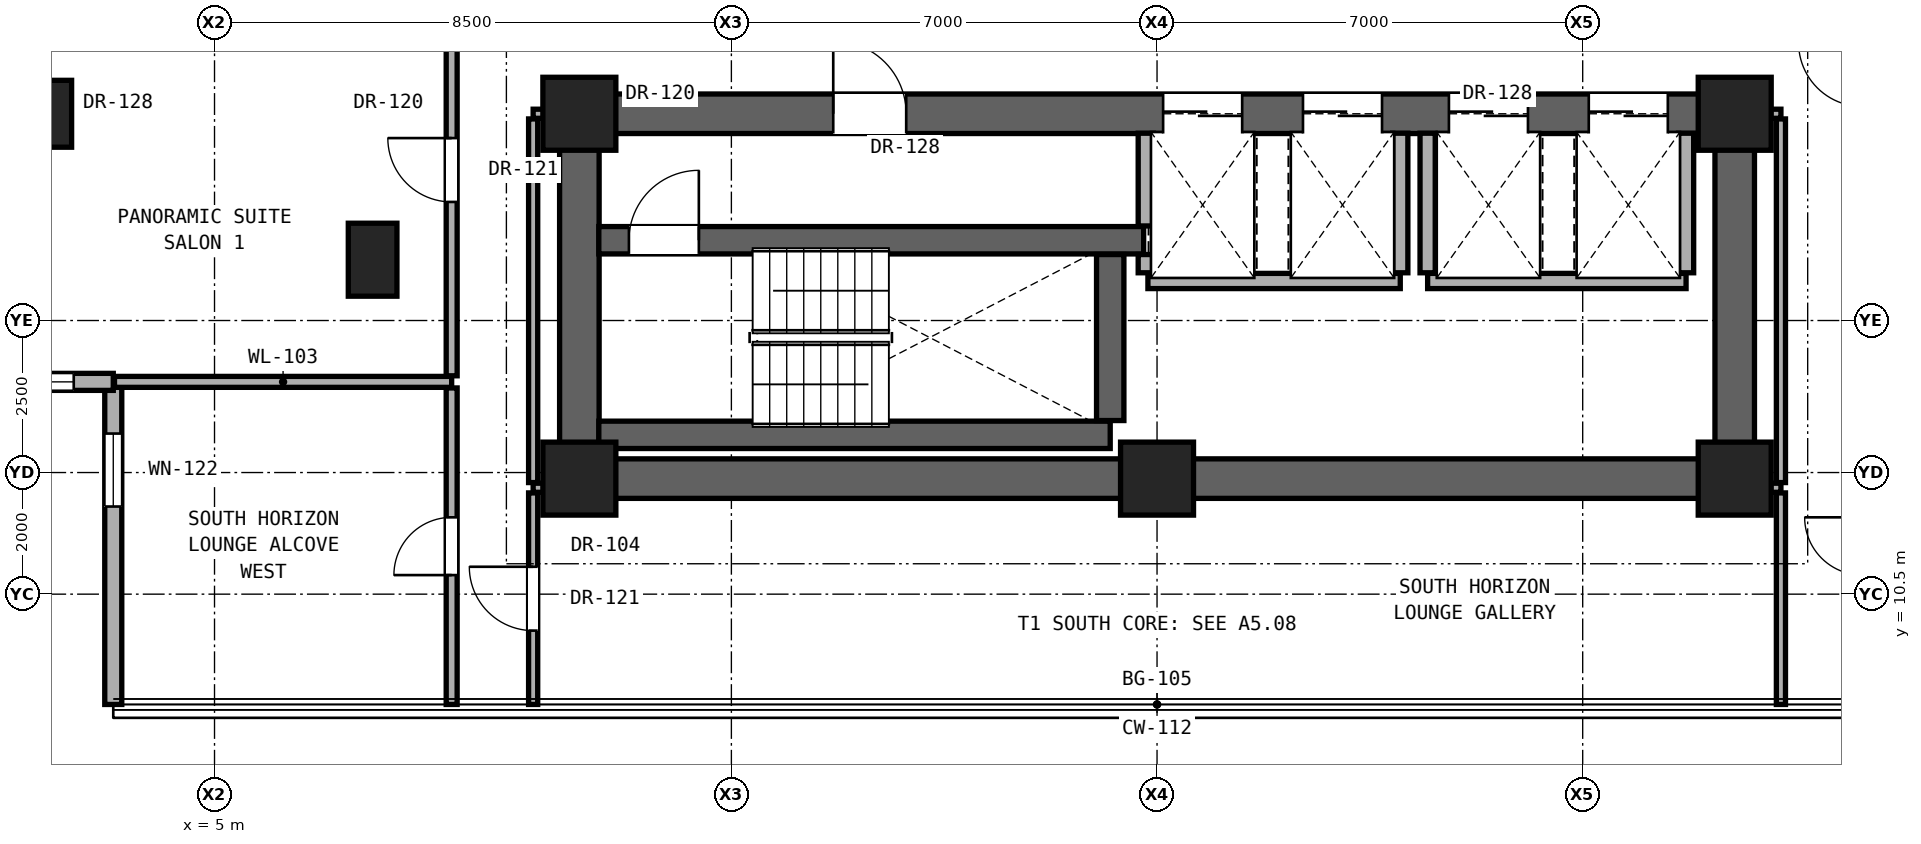
"""IFC4 building model, lengths in metres.
Left out: names, types, materials, properties, quantities, classifications, styles, units other than length and angle.
Written with IfcOpenShell. Run it as: python <this file> out.ifc"""

import sys

from ifc_helpers import new_model, si_unit, direction, frame, frame_2d, origin, origin_2d, place, context, subcontext, project, spatial, rectangle, hollow_rectangle, extrude, element, fill, save


model = new_model("IFC4")
c1 = context("Model", 3, precision=1e-05, world=origin(), true_north=direction((0.0, 1.0)))
c2 = subcontext(c1, "Body", "Model", "MODEL_VIEW")
j1 = project(units=[si_unit("LENGTHUNIT", "METRE"), si_unit("PLANEANGLEUNIT", "RADIAN")], contexts=[c1])
p1 = place(None, origin())
s1 = spatial("IfcSite", under=j1, at=p1, CompositionType="ELEMENT")
p2 = place(p1, origin())
s2 = spatial("IfcBuilding", under=s1, at=p2, CompositionType="ELEMENT")
p3 = place(p2, frame((0.0, 0.0, 114.8)))
s3 = spatial("IfcBuildingStorey", under=s2, at=p3, CompositionType="ELEMENT", Elevation=114.8)
for number, where, z_axis, x_axis in (
    (1, (11.0, 12.4, 0.0), (0.0, 0.0, 1.0), (1.0, 0.0, 0.0)),
    (2, (20.5, 12.4, 0.0), (0.0, 0.0, 1.0), (1.0, 0.0, 0.0)),
    (3, (30.0, 12.4, 0.0), (0.0, 0.0, 1.0), (1.0, 0.0, 0.0)),
    (4, (11.0, 18.4, 0.0), (0.0, 0.0, 1.0), (1.0, 0.0, 0.0)),
    (5, (30.0, 18.4, 0.0), (0.0, 0.0, 1.0), (1.0, 0.0, 0.0)),
):
    element("IfcColumn", number, at=place(p3, frame(where, z_axis=z_axis, x_axis=x_axis)), inside=s3, PredefinedType="COLUMN", context=c2, shape_type="SweptSolid", body=[
        extrude(rectangle(XDim=1.2, YDim=1.2, at=origin_2d()), origin(), (0.0, 0.0, 1.0), 3.3),
    ])
p4 = place(p3, frame((2.1, 18.4, 0.0), z_axis=(0.0, 0.0, 1.0), x_axis=(1.0, 0.0, 0.0)))
e6 = element("IfcColumn", 6, at=p4, inside=s3, PredefinedType="COLUMN", context=c2, shape_type="SweptSolid", body=[
    extrude(hollow_rectangle(XDim=1.1, YDim=1.1, WallThickness=0.06, at=origin_2d()), origin(), (0.0, 0.0, 1.0), 3.3),
])
p5 = place(p3, frame((7.6, 16.0, 0.0), z_axis=(0.0, 0.0, 1.0), x_axis=(1.0, 0.0, 0.0)))
e7 = element("IfcColumn", 7, at=p5, inside=s3, PredefinedType="PILASTER", context=c2, shape_type="SweptSolid", body=[
    extrude(rectangle(XDim=0.8, YDim=1.2, at=origin_2d()), origin(), (0.0, 0.0, 1.0), 3.3),
])
p6 = place(p3, frame((11.0, 12.4, 0.0), z_axis=(0.0, 0.0, 1.0), x_axis=(1.0, 0.0, 0.0)))
e8 = element("IfcWall", 8, at=p6, inside=s3, PredefinedType="SHEAR", context=c2, shape_type="SweptSolid", body=[
    extrude(rectangle(XDim=19.0, YDim=0.65, at=frame_2d((9.5, 0.0))), origin(), (0.0, 0.0, 1.0), 3.08),
])
for number, where, z_axis, x_axis in (
    (9, (11.0, 12.4, 0.0), (0.0, 0.0, 1.0), (0.0, 1.0, 0.0)),
    (10, (30.0, 12.4, 0.0), (0.0, 0.0, 1.0), (0.0, 1.0, 0.0)),
):
    element("IfcWall", number, at=place(p3, frame(where, z_axis=z_axis, x_axis=x_axis)), inside=s3, PredefinedType="SHEAR", context=c2, shape_type="SweptSolid", body=[
        extrude(rectangle(XDim=6.0, YDim=0.65, at=frame_2d((3.0, 0.0))), origin(), (0.0, 0.0, 1.0), 3.08),
    ])
p7 = place(p3, frame((11.0, 18.4, 0.0), z_axis=(0.0, 0.0, 1.0), x_axis=(1.0, 0.0, 0.0)))
e11 = element("IfcWall", 11, at=p7, inside=s3, PredefinedType="SHEAR", context=c2, shape_type="SweptSolid", body=[
    extrude(rectangle(XDim=19.0, YDim=0.65, at=frame_2d((9.5, 0.0))), origin(), (0.0, 0.0, 1.0), 3.08),
])
p8 = place(p7, frame((4.175, 0.0, 0.0)))
e12 = element("IfcOpeningElement", 12, at=p8, cuts=e11, PredefinedType="OPENING", context=c2, shape_type="SweptSolid", body=[
    extrude(rectangle(XDim=1.2, YDim=2.25, at=frame_2d((0.6, 1.125))), frame((0.0, 0.335, 0.0), z_axis=(0.0, -1.0, 0.0), x_axis=(1.0, 0.0, 0.0)), (0.0, 0.0, 1.0), 0.67),
])
p9 = place(p7, frame((9.6, 0.0, 0.0)))
e13 = element("IfcOpeningElement", 13, at=p9, cuts=e11, PredefinedType="OPENING", context=c2, shape_type="SweptSolid", body=[
    extrude(rectangle(XDim=1.3, YDim=2.3, at=frame_2d((0.65, 1.15))), frame((0.0, 0.335, 0.0), z_axis=(0.0, -1.0, 0.0), x_axis=(1.0, 0.0, 0.0)), (0.0, 0.0, 1.0), 0.67),
])
p10 = place(p7, frame((11.9, 0.0, 0.0)))
e14 = element("IfcOpeningElement", 14, at=p10, cuts=e11, PredefinedType="OPENING", context=c2, shape_type="SweptSolid", body=[
    extrude(rectangle(XDim=1.3, YDim=2.3, at=frame_2d((0.65, 1.15))), frame((0.0, 0.335, 0.0), z_axis=(0.0, -1.0, 0.0), x_axis=(1.0, 0.0, 0.0)), (0.0, 0.0, 1.0), 0.67),
])
p11 = place(p7, frame((14.3, 0.0, 0.0)))
e15 = element("IfcOpeningElement", 15, at=p11, cuts=e11, PredefinedType="OPENING", context=c2, shape_type="SweptSolid", body=[
    extrude(rectangle(XDim=1.3, YDim=2.3, at=frame_2d((0.65, 1.15))), frame((0.0, 0.335, 0.0), z_axis=(0.0, -1.0, 0.0), x_axis=(1.0, 0.0, 0.0)), (0.0, 0.0, 1.0), 0.67),
])
p12 = place(p7, frame((16.6, 0.0, 0.0)))
e16 = element("IfcOpeningElement", 16, at=p12, cuts=e11, PredefinedType="OPENING", context=c2, shape_type="SweptSolid", body=[
    extrude(rectangle(XDim=1.3, YDim=2.3, at=frame_2d((0.65, 1.15))), frame((0.0, 0.335, 0.0), z_axis=(0.0, -1.0, 0.0), x_axis=(1.0, 0.0, 0.0)), (0.0, 0.0, 1.0), 0.67),
])
p13 = place(p3, frame((3.335, 13.991, 0.0), z_axis=(0.0, 0.0, 1.0), x_axis=(0.0, -1.0, 0.0)))
e17 = element("IfcWall", 17, at=p13, inside=s3, PredefinedType="SOLIDWALL", context=c2, shape_type="SweptSolid", body=[
    extrude(rectangle(XDim=5.305, YDim=0.28, at=frame_2d((2.652, 0.0))), origin(), (0.0, 0.0, 1.0), 3.06),
])
p14 = place(p13, frame((0.85, 0.0, 0.81)))
e18 = element("IfcOpeningElement", 18, at=p14, cuts=e17, PredefinedType="OPENING", context=c2, shape_type="SweptSolid", body=[
    extrude(rectangle(XDim=1.2, YDim=2.1, at=frame_2d((0.6, 1.05))), frame((0.0, 0.15, 0.0), z_axis=(0.0, -1.0, 0.0), x_axis=(1.0, 0.0, 0.0)), (0.0, 0.0, 1.0), 0.3),
])
p15 = place(p3, frame((-1.97, 13.991, 0.0), z_axis=(0.0, 0.0, 1.0), x_axis=(1.0, 0.0, 0.0)))
e19 = element("IfcWall", 19, at=p15, inside=s3, PredefinedType="SOLIDWALL", context=c2, shape_type="SweptSolid", body=[
    extrude(rectangle(XDim=5.305, YDim=0.28, at=frame_2d((2.652, 0.0))), origin(), (0.0, 0.0, 1.0), 3.06),
])
p16 = place(p15, frame((3.555, 0.0, 0.85)))
e20 = element("IfcOpeningElement", 20, at=p16, cuts=e19, PredefinedType="OPENING", context=c2, shape_type="SweptSolid", body=[
    extrude(rectangle(XDim=1.1, YDim=2.0, at=frame_2d((0.55, 1.0))), frame((0.0, 0.15, 0.0), z_axis=(0.0, -1.0, 0.0), x_axis=(1.0, 0.0, 0.0)), (0.0, 0.0, 1.0), 0.3),
])
for number, where, z_axis, x_axis in (
    (21, (10.24, 12.25, 0.0), (0.0, 0.0, 1.0), (1.0, 0.0, 0.0)),
    (22, (30.32, 12.25, 0.0), (0.0, 0.0, 1.0), (1.0, 0.0, 0.0)),
):
    element("IfcWall", number, at=place(p3, frame(where, z_axis=z_axis, x_axis=x_axis)), inside=s3, PredefinedType="PARTITIONING", context=c2, shape_type="SweptSolid", body=[
        extrude(rectangle(XDim=0.44, YDim=0.15, at=frame_2d((0.22, 0.0))), origin(), (0.0, 0.0, 1.0), 3.08),
    ])
p17 = place(p3, frame((11.32, 13.12, 0.0), z_axis=(0.0, 0.0, 1.0), x_axis=(1.0, 0.0, 0.0)))
e23 = element("IfcWall", 23, at=p17, inside=s3, PredefinedType="SHEAR", context=c2, shape_type="SweptSolid", body=[
    extrude(rectangle(XDim=8.41, YDim=0.45, at=frame_2d((4.205, 0.0))), origin(), (0.0, 0.0, 1.0), 3.08),
])
p18 = place(p3, frame((3.355, 13.991, 0.0), z_axis=(0.0, 0.0, 1.0), x_axis=(1.0, 0.0, 0.0)))
e24 = element("IfcWall", 24, at=p18, inside=s3, PredefinedType="PARTITIONING", context=c2, shape_type="SweptSolid", body=[
    extrude(rectangle(XDim=5.545, YDim=0.18, at=frame_2d((2.772, 0.0))), origin(), (0.0, 0.0, 1.0), 3.08),
])
p19 = place(p3, frame((20.35, 15.65, 0.0), z_axis=(0.0, 0.0, 1.0), x_axis=(1.0, 0.0, 0.0)))
e25 = element("IfcWall", 25, at=p19, inside=s3, PredefinedType="SOLIDWALL", context=c2, shape_type="SweptSolid", body=[
    extrude(rectangle(XDim=4.15, YDim=0.25, at=frame_2d((2.075, 0.0))), origin(), (0.0, 0.0, 1.0), 3.08),
])
p20 = place(p3, frame((24.95, 15.65, 0.0), z_axis=(0.0, 0.0, 1.0), x_axis=(1.0, 0.0, 0.0)))
e26 = element("IfcWall", 26, at=p20, inside=s3, PredefinedType="SOLIDWALL", context=c2, shape_type="SweptSolid", body=[
    extrude(rectangle(XDim=4.25, YDim=0.25, at=frame_2d((2.125, 0.0))), origin(), (0.0, 0.0, 1.0), 3.08),
])
p21 = place(p3, frame((11.32, 16.32, 0.0), z_axis=(0.0, 0.0, 1.0), x_axis=(1.0, 0.0, 0.0)))
e27 = element("IfcWall", 27, at=p21, inside=s3, PredefinedType="SHEAR", context=c2, shape_type="SweptSolid", body=[
    extrude(rectangle(XDim=8.96, YDim=0.45, at=frame_2d((4.48, 0.0))), origin(), (0.0, 0.0, 1.0), 3.08),
])
p22 = place(p21, frame((0.495, 0.0, 0.0)))
e28 = element("IfcOpeningElement", 28, at=p22, cuts=e27, PredefinedType="OPENING", context=c2, shape_type="SweptSolid", body=[
    extrude(rectangle(XDim=1.15, YDim=2.2, at=frame_2d((0.575, 1.1))), frame((0.0, 0.235, 0.0), z_axis=(0.0, -1.0, 0.0), x_axis=(1.0, 0.0, 0.0)), (0.0, 0.0, 1.0), 0.47),
])
for number, where, z_axis, x_axis in (
    (29, (10.24, 18.4, 0.0), (0.0, 0.0, 1.0), (1.0, 0.0, 0.0)),
    (30, (30.32, 18.4, 0.0), (0.0, 0.0, 1.0), (1.0, 0.0, 0.0)),
):
    element("IfcWall", number, at=place(p3, frame(where, z_axis=z_axis, x_axis=x_axis)), inside=s3, PredefinedType="PARTITIONING", context=c2, shape_type="SweptSolid", body=[
        extrude(rectangle(XDim=0.44, YDim=0.15, at=frame_2d((0.22, 0.0))), origin(), (0.0, 0.0, 1.0), 2.456),
    ])
p23 = place(p3, frame((8.9, 8.686, 0.0), z_axis=(0.0, 0.0, 1.0), x_axis=(0.0, 1.0, 0.0)))
e31 = element("IfcWall", 31, at=p23, inside=s3, PredefinedType="PARTITIONING", context=c2, shape_type="SweptSolid", body=[
    extrude(rectangle(XDim=5.205, YDim=0.18, at=frame_2d((2.603, 0.0))), origin(), (0.0, 0.0, 1.0), 3.08),
])
p24 = place(p23, frame((2.127, 0.0, 0.0)))
e32 = element("IfcOpeningElement", 32, at=p24, cuts=e31, PredefinedType="OPENING", context=c2, shape_type="SweptSolid", body=[
    extrude(rectangle(XDim=0.95, YDim=2.15, at=frame_2d((0.475, 1.075))), frame((0.0, 0.1, 0.0), z_axis=(0.0, -1.0, 0.0), x_axis=(1.0, 0.0, 0.0)), (0.0, 0.0, 1.0), 0.2),
])
p25 = place(p3, frame((8.9, 14.091, 0.0), z_axis=(0.0, 0.0, 1.0), x_axis=(0.0, 1.0, 0.0)))
e33 = element("IfcWall", 33, at=p25, inside=s3, PredefinedType="PARTITIONING", context=c2, shape_type="SweptSolid", body=[
    extrude(rectangle(XDim=5.568, YDim=0.18, at=frame_2d((2.784, 0.0))), origin(), (0.0, 0.0, 1.0), 2.456),
])
p26 = place(p25, frame((2.859, 0.0, 0.0)))
e34 = element("IfcOpeningElement", 34, at=p26, cuts=e33, PredefinedType="OPENING", context=c2, shape_type="SweptSolid", body=[
    extrude(rectangle(XDim=1.05, YDim=2.2, at=frame_2d((0.525, 1.1))), frame((0.0, 0.1, 0.0), z_axis=(0.0, -1.0, 0.0), x_axis=(1.0, 0.0, 0.0)), (0.0, 0.0, 1.0), 0.2),
])
p27 = place(p3, frame((10.24, 8.686, 0.0), z_axis=(0.0, 0.0, 1.0), x_axis=(0.0, 1.0, 0.0)))
e35 = element("IfcWall", 35, at=p27, inside=s3, PredefinedType="PARTITIONING", context=c2, shape_type="SweptSolid", body=[
    extrude(rectangle(XDim=3.479, YDim=0.15, at=frame_2d((1.74, 0.0))), origin(), (0.0, 0.0, 1.0), 3.08),
])
p28 = place(p27, frame((1.215, 0.0, 0.0)))
e36 = element("IfcOpeningElement", 36, at=p28, cuts=e35, PredefinedType="OPENING", context=c2, shape_type="SweptSolid", body=[
    extrude(rectangle(XDim=1.05, YDim=2.2, at=frame_2d((0.525, 1.1))), frame((0.0, 0.085, 0.0), z_axis=(0.0, -1.0, 0.0), x_axis=(1.0, 0.0, 0.0)), (0.0, 0.0, 1.0), 0.17),
])
p29 = place(p3, frame((10.24, 12.335, 0.0), z_axis=(0.0, 0.0, 1.0), x_axis=(0.0, 1.0, 0.0)))
e37 = element("IfcWall", 37, at=p29, inside=s3, PredefinedType="PARTITIONING", context=c2, shape_type="SweptSolid", body=[
    extrude(rectangle(XDim=5.98, YDim=0.15, at=frame_2d((2.99, 0.0))), origin(), (0.0, 0.0, 1.0), 2.456),
])
p30 = place(p3, frame((19.73, 13.355, 0.0), z_axis=(0.0, 0.0, 1.0), x_axis=(0.0, 1.0, 0.0)))
e38 = element("IfcWall", 38, at=p30, inside=s3, PredefinedType="SHEAR", context=c2, shape_type="SweptSolid", body=[
    extrude(rectangle(XDim=2.73, YDim=0.45, at=frame_2d((1.365, 0.0))), origin(), (0.0, 0.0, 1.0), 3.08),
])
p31 = place(p3, frame((20.315, 15.785, 0.0), z_axis=(0.0, 0.0, 1.0), x_axis=(0.0, 1.0, 0.0)))
e39 = element("IfcWall", 39, at=p31, inside=s3, PredefinedType="SOLIDWALL", context=c2, shape_type="SweptSolid", body=[
    extrude(rectangle(XDim=0.3, YDim=0.25, at=frame_2d((0.15, 0.0))), origin(), (0.0, 0.0, 1.0), 3.08),
])
p32 = place(p3, frame((20.315, 16.555, 0.0), z_axis=(0.0, 0.0, 1.0), x_axis=(0.0, 1.0, 0.0)))
e40 = element("IfcWall", 40, at=p32, inside=s3, PredefinedType="SOLIDWALL", context=c2, shape_type="SweptSolid", body=[
    extrude(rectangle(XDim=1.525, YDim=0.25, at=frame_2d((0.763, 0.0))), origin(), (0.0, 0.0, 1.0), 3.08),
])
for number, where, z_axis, x_axis in (
    (41, (24.5, 15.785, 0.0), (0.0, 0.0, 1.0), (0.0, 1.0, 0.0)),
    (42, (24.95, 15.785, 0.0), (0.0, 0.0, 1.0), (0.0, 1.0, 0.0)),
    (43, (29.2, 15.785, 0.0), (0.0, 0.0, 1.0), (0.0, 1.0, 0.0)),
):
    element("IfcWall", number, at=place(p3, frame(where, z_axis=z_axis, x_axis=x_axis)), inside=s3, PredefinedType="SOLIDWALL", context=c2, shape_type="SweptSolid", body=[
        extrude(rectangle(XDim=2.295, YDim=0.25, at=frame_2d((1.147, 0.0))), origin(), (0.0, 0.0, 1.0), 3.08),
    ])
p33 = place(p3, frame((30.76, 8.686, 0.0), z_axis=(0.0, 0.0, 1.0), x_axis=(0.0, 1.0, 0.0)))
e44 = element("IfcWall", 44, at=p33, inside=s3, PredefinedType="PARTITIONING", context=c2, shape_type="SweptSolid", body=[
    extrude(rectangle(XDim=3.479, YDim=0.15, at=frame_2d((1.74, 0.0))), origin(), (0.0, 0.0, 1.0), 3.08),
])
p34 = place(p3, frame((30.76, 12.335, 0.0), z_axis=(0.0, 0.0, 1.0), x_axis=(0.0, 1.0, 0.0)))
e45 = element("IfcWall", 45, at=p34, inside=s3, PredefinedType="PARTITIONING", context=c2, shape_type="SweptSolid", body=[
    extrude(rectangle(XDim=5.98, YDim=0.15, at=frame_2d((2.99, 0.0))), origin(), (0.0, 0.0, 1.0), 2.456),
])
p35 = place(p14, origin())
e46 = element("IfcWindow", 46, at=p35, inside=s3, PartitioningType="SINGLE_PANEL", PredefinedType="WINDOW", context=c2, shape_type="SweptSolid", body=[
    extrude(rectangle(XDim=1.2, YDim=2.1, at=frame_2d((0.6, 1.05))), frame((0.0, 0.03, 0.0), z_axis=(0.0, -1.0, 0.0), x_axis=(1.0, 0.0, 0.0)), (0.0, 0.0, 1.0), 0.06),
])
fill(e18, e46)
p36 = place(p16, origin())
e47 = element("IfcWindow", 47, at=p36, inside=s3, PartitioningType="SINGLE_PANEL", PredefinedType="WINDOW", context=c2, shape_type="SweptSolid", body=[
    extrude(rectangle(XDim=1.1, YDim=2.0, at=frame_2d((0.55, 1.0))), frame((0.0, 0.03, 0.0), z_axis=(0.0, -1.0, 0.0), x_axis=(1.0, 0.0, 0.0)), (0.0, 0.0, 1.0), 0.06),
])
fill(e20, e47)
p37 = place(p8, origin())
e48 = element("IfcDoor", 48, at=p37, inside=s3, OperationType="SINGLE_SWING_LEFT", PredefinedType="DOOR", context=c2, shape_type="SweptSolid", body=[
    extrude(rectangle(XDim=1.2, YDim=2.25, at=frame_2d((0.6, 1.125))), frame((0.0, 0.025, 0.0), z_axis=(0.0, -1.0, 0.0), x_axis=(1.0, 0.0, 0.0)), (0.0, 0.0, 1.0), 0.05),
])
fill(e12, e48)
p38 = place(p22, origin())
e49 = element("IfcDoor", 49, at=p38, inside=s3, OperationType="SINGLE_SWING_RIGHT", PredefinedType="DOOR", context=c2, shape_type="SweptSolid", body=[
    extrude(rectangle(XDim=1.15, YDim=2.2, at=frame_2d((0.575, 1.1))), frame((0.0, 0.025, 0.0), z_axis=(0.0, -1.0, 0.0), x_axis=(1.0, 0.0, 0.0)), (0.0, 0.0, 1.0), 0.05),
])
fill(e28, e49)
p39 = place(p26, origin())
e50 = element("IfcDoor", 50, at=p39, inside=s3, OperationType="SINGLE_SWING_RIGHT", PredefinedType="DOOR", context=c2, shape_type="SweptSolid", body=[
    extrude(rectangle(XDim=1.05, YDim=2.2, at=frame_2d((0.525, 1.1))), frame((0.0, 0.025, 0.0), z_axis=(0.0, -1.0, 0.0), x_axis=(1.0, 0.0, 0.0)), (0.0, 0.0, 1.0), 0.05),
])
fill(e34, e50)
p40 = place(p28, origin())
e51 = element("IfcDoor", 51, at=p40, inside=s3, OperationType="SINGLE_SWING_RIGHT", PredefinedType="DOOR", context=c2, shape_type="SweptSolid", body=[
    extrude(rectangle(XDim=1.05, YDim=2.2, at=frame_2d((0.525, 1.1))), frame((0.0, 0.025, 0.0), z_axis=(0.0, -1.0, 0.0), x_axis=(1.0, 0.0, 0.0)), (0.0, 0.0, 1.0), 0.05),
])
fill(e36, e51)
p41 = place(p24, origin())
e52 = element("IfcDoor", 52, at=p41, inside=s3, OperationType="SINGLE_SWING_LEFT", PredefinedType="DOOR", context=c2, shape_type="SweptSolid", body=[
    extrude(rectangle(XDim=0.95, YDim=2.15, at=frame_2d((0.475, 1.075))), frame((0.0, 0.025, 0.0), z_axis=(0.0, -1.0, 0.0), x_axis=(1.0, 0.0, 0.0)), (0.0, 0.0, 1.0), 0.05),
])
fill(e32, e52)
p42 = place(p9, origin())
e53 = element("IfcDoor", 53, at=p42, inside=s3, OperationType="DOUBLE_DOOR_SLIDING", PredefinedType="DOOR", context=c2, shape_type="SweptSolid", body=[
    extrude(rectangle(XDim=1.3, YDim=2.3, at=frame_2d((0.65, 1.15))), frame((0.0, 0.025, 0.0), z_axis=(0.0, -1.0, 0.0), x_axis=(1.0, 0.0, 0.0)), (0.0, 0.0, 1.0), 0.05),
])
fill(e13, e53)
p43 = place(p10, origin())
e54 = element("IfcDoor", 54, at=p43, inside=s3, OperationType="DOUBLE_DOOR_SLIDING", PredefinedType="DOOR", context=c2, shape_type="SweptSolid", body=[
    extrude(rectangle(XDim=1.3, YDim=2.3, at=frame_2d((0.65, 1.15))), frame((0.0, 0.025, 0.0), z_axis=(0.0, -1.0, 0.0), x_axis=(1.0, 0.0, 0.0)), (0.0, 0.0, 1.0), 0.05),
])
fill(e14, e54)
p44 = place(p11, origin())
e55 = element("IfcDoor", 55, at=p44, inside=s3, OperationType="DOUBLE_DOOR_SLIDING", PredefinedType="DOOR", context=c2, shape_type="SweptSolid", body=[
    extrude(rectangle(XDim=1.3, YDim=2.3, at=frame_2d((0.65, 1.15))), frame((0.0, 0.025, 0.0), z_axis=(0.0, -1.0, 0.0), x_axis=(1.0, 0.0, 0.0)), (0.0, 0.0, 1.0), 0.05),
])
fill(e15, e55)
p45 = place(p12, origin())
e56 = element("IfcDoor", 56, at=p45, inside=s3, OperationType="DOUBLE_DOOR_SLIDING", PredefinedType="DOOR", context=c2, shape_type="SweptSolid", body=[
    extrude(rectangle(XDim=1.3, YDim=2.3, at=frame_2d((0.65, 1.15))), frame((0.0, 0.025, 0.0), z_axis=(0.0, -1.0, 0.0), x_axis=(1.0, 0.0, 0.0)), (0.0, 0.0, 1.0), 0.05),
])
fill(e16, e56)
save(model, sys.argv[1])
